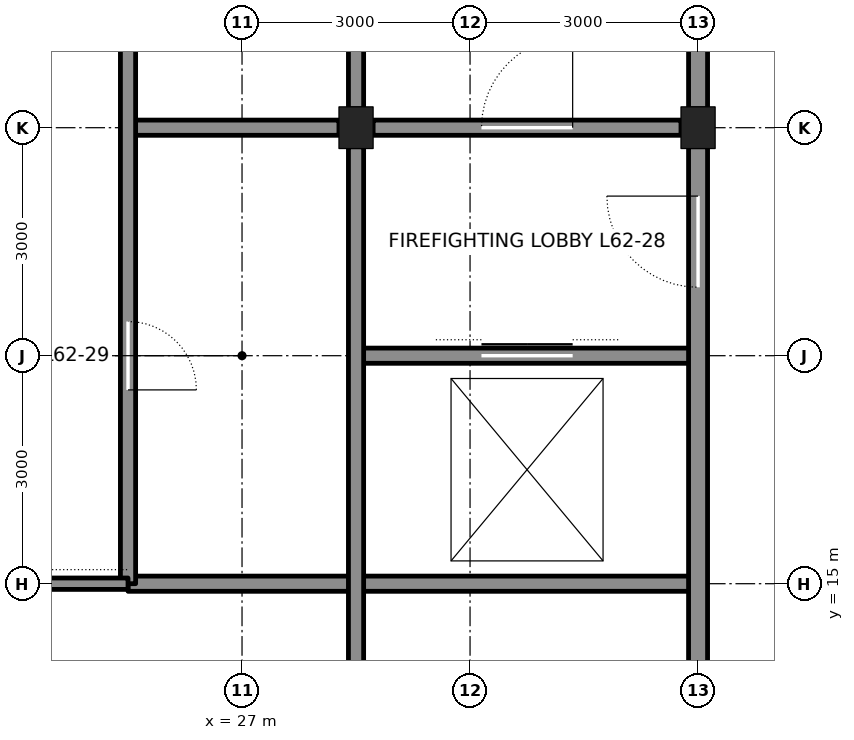
"""IFC4 building model, lengths in metres.
Left out: names, types, materials, properties, quantities, classifications, styles, units other than length and angle.
Written with IfcOpenShell. Run it as: python <this file> out.ifc"""

import sys

from ifc_helpers import new_model, si_unit, direction, frame, frame_2d, origin, origin_2d, place, context, subcontext, project, spatial, rectangle, i_section, extrude, element, fill, save


model = new_model("IFC4")
c1 = context("Model", 3, precision=1e-05, world=origin(), true_north=direction((0.0, 1.0)))
c2 = subcontext(c1, "Body", "Model", "MODEL_VIEW")
j1 = project(units=[si_unit("LENGTHUNIT", "METRE"), si_unit("PLANEANGLEUNIT", "RADIAN")], contexts=[c1])
p1 = place(None, origin())
s1 = spatial("IfcSite", under=j1, at=p1, CompositionType="ELEMENT")
p2 = place(p1, origin())
s2 = spatial("IfcBuilding", under=s1, at=p2, CompositionType="ELEMENT")
p3 = place(p2, frame((0.0, 0.0, 279.0)))
s3 = spatial("IfcBuildingStorey", under=s2, at=p3, CompositionType="ELEMENT", Elevation=279.0)
for number, where, z_axis, x_axis in (
    (1, (33.0, 21.0, 0.0), (0.0, 0.0, 1.0), (1.0, 0.0, 0.0)),
    (2, (28.5, 21.0, 0.0), (0.0, 0.0, 1.0), (1.0, 0.0, 0.0)),
):
    element("IfcColumn", number, at=place(p3, frame(where, z_axis=z_axis, x_axis=x_axis)), inside=s3, PredefinedType="COLUMN", context=c2, shape_type="SweptSolid", body=[
        extrude(i_section(OverallWidth=0.449, OverallDepth=0.549, WebThickness=0.072, FlangeThickness=0.115, at=origin_2d()), origin(), (0.0, 0.0, 1.0), 4.2),
    ])
p4 = place(p3, frame((25.5, 15.0, 0.0), z_axis=(0.0, 0.0, 1.0), x_axis=(1.0, 0.0, 0.0)))
e3 = element("IfcWall", 3, at=p4, inside=s3, PredefinedType="SOLIDWALL", context=c2, shape_type="SweptSolid", body=[
    extrude(rectangle(XDim=7.5, YDim=0.2, at=frame_2d((3.75, 0.0))), origin(), (0.0, 0.0, 1.0), 4.04),
])
p5 = place(p3, frame((28.5, 18.0, 0.0), z_axis=(0.0, 0.0, 1.0), x_axis=(1.0, 0.0, 0.0)))
e4 = element("IfcWall", 4, at=p5, inside=s3, PredefinedType="SOLIDWALL", context=c2, shape_type="SweptSolid", body=[
    extrude(rectangle(XDim=4.5, YDim=0.2, at=frame_2d((2.25, 0.0))), origin(), (0.0, 0.0, 1.0), 4.04),
])
p6 = place(p5, frame((1.65, 0.0, 0.0)))
e5 = element("IfcOpeningElement", 5, at=p6, cuts=e4, PredefinedType="OPENING", context=c2, shape_type="SweptSolid", body=[
    extrude(rectangle(XDim=1.2, YDim=2.1, at=frame_2d((0.6, 1.05))), frame((0.0, 0.11, 0.0), z_axis=(0.0, -1.0, 0.0), x_axis=(1.0, 0.0, 0.0)), (0.0, 0.0, 1.0), 0.22),
])
p7 = place(p3, frame((25.5, 21.0, 0.0), z_axis=(0.0, 0.0, 1.0), x_axis=(1.0, 0.0, 0.0)))
e6 = element("IfcWall", 6, at=p7, inside=s3, PredefinedType="SOLIDWALL", context=c2, shape_type="SweptSolid", body=[
    extrude(rectangle(XDim=2.775, YDim=0.2, at=frame_2d((1.388, 0.0))), origin(), (0.0, 0.0, 1.0), 3.09),
])
p8 = place(p3, frame((28.725, 21.0, 0.0), z_axis=(0.0, 0.0, 1.0), x_axis=(1.0, 0.0, 0.0)))
e7 = element("IfcWall", 7, at=p8, inside=s3, PredefinedType="SOLIDWALL", context=c2, shape_type="SweptSolid", body=[
    extrude(rectangle(XDim=4.05, YDim=0.2, at=frame_2d((2.025, 0.0))), origin(), (0.0, 0.0, 1.0), 3.09),
])
p9 = place(p8, frame((1.425, 0.0, 0.0)))
e8 = element("IfcOpeningElement", 8, at=p9, cuts=e7, PredefinedType="OPENING", context=c2, shape_type="SweptSolid", body=[
    extrude(rectangle(XDim=1.2, YDim=2.1, at=frame_2d((0.6, 1.05))), frame((0.0, 0.11, 0.0), z_axis=(0.0, -1.0, 0.0), x_axis=(1.0, 0.0, 0.0)), (0.0, 0.0, 1.0), 0.22),
])
p10 = place(p3, frame((25.5, 15.0, 0.0), z_axis=(0.0, 0.0, 1.0), x_axis=(0.0, 1.0, 0.0)))
e9 = element("IfcWall", 9, at=p10, inside=s3, PredefinedType="SOLIDWALL", context=c2, shape_type="SweptSolid", body=[
    extrude(rectangle(XDim=12.0, YDim=0.2, at=frame_2d((6.0, 0.0))), origin(), (0.0, 0.0, 1.0), 3.065),
])
p11 = place(p10, frame((2.55, 0.0, 0.0)))
e10 = element("IfcOpeningElement", 10, at=p11, cuts=e9, PredefinedType="OPENING", context=c2, shape_type="SweptSolid", body=[
    extrude(rectangle(XDim=0.9, YDim=2.1, at=frame_2d((0.45, 1.05))), frame((0.0, 0.11, 0.0), z_axis=(0.0, -1.0, 0.0), x_axis=(1.0, 0.0, 0.0)), (0.0, 0.0, 1.0), 0.22),
])
p12 = place(p3, frame((28.5, 12.25, 0.0), z_axis=(0.0, 0.0, 1.0), x_axis=(0.0, 1.0, 0.0)))
e11 = element("IfcWall", 11, at=p12, inside=s3, PredefinedType="SOLIDWALL", context=c2, shape_type="SweptSolid", body=[
    extrude(rectangle(XDim=8.5, YDim=0.2, at=frame_2d((4.25, 0.0))), origin(), (0.0, 0.0, 1.0), 3.113),
])
p13 = place(p3, frame((28.5, 21.25, 0.0), z_axis=(0.0, 0.0, 1.0), x_axis=(0.0, 1.0, 0.0)))
e12 = element("IfcWall", 12, at=p13, inside=s3, PredefinedType="SOLIDWALL", context=c2, shape_type="SweptSolid", body=[
    extrude(rectangle(XDim=2.5, YDim=0.2, at=frame_2d((1.25, 0.0))), origin(), (0.0, 0.0, 1.0), 3.113),
])
p14 = place(p3, frame((33.0, 12.25, 0.0), z_axis=(0.0, 0.0, 1.0), x_axis=(0.0, 1.0, 0.0)))
e13 = element("IfcWall", 13, at=p14, inside=s3, PredefinedType="SOLIDWALL", context=c2, shape_type="SweptSolid", body=[
    extrude(rectangle(XDim=8.5, YDim=0.25, at=frame_2d((4.25, 0.0))), origin(), (0.0, 0.0, 1.0), 3.113),
])
p15 = place(p14, frame((6.65, 0.0, 0.0)))
e14 = element("IfcOpeningElement", 14, at=p15, cuts=e13, PredefinedType="OPENING", context=c2, shape_type="SweptSolid", body=[
    extrude(rectangle(XDim=1.2, YDim=2.1, at=frame_2d((0.6, 1.05))), frame((0.0, 0.135, 0.0), z_axis=(0.0, -1.0, 0.0), x_axis=(1.0, 0.0, 0.0)), (0.0, 0.0, 1.0), 0.27),
])
p16 = place(p14, frame((0.875, 0.0, 0.0)))
e15 = element("IfcOpeningElement", 15, at=p16, cuts=e13, PredefinedType="OPENING", context=c2, shape_type="SweptSolid", body=[
    extrude(rectangle(XDim=0.75, YDim=2.1, at=frame_2d((0.375, 1.05))), frame((0.0, 0.135, 0.0), z_axis=(0.0, -1.0, 0.0), x_axis=(1.0, 0.0, 0.0)), (0.0, 0.0, 1.0), 0.27),
])
p17 = place(p3, frame((33.0, 21.25, 0.0), z_axis=(0.0, 0.0, 1.0), x_axis=(0.0, 1.0, 0.0)))
e16 = element("IfcWall", 16, at=p17, inside=s3, PredefinedType="SOLIDWALL", context=c2, shape_type="SweptSolid", body=[
    extrude(rectangle(XDim=2.5, YDim=0.25, at=frame_2d((1.25, 0.0))), origin(), (0.0, 0.0, 1.0), 3.113),
])
p18 = place(p3, frame((19.5, 15.0, 0.0), z_axis=(0.0, 0.0, 1.0), x_axis=(1.0, 0.0, 0.0)))
e17 = element("IfcWall", 17, at=p18, inside=s3, PredefinedType="PARTITIONING", context=c2, shape_type="SweptSolid", body=[
    extrude(rectangle(XDim=6.0, YDim=0.15, at=frame_2d((3.0, 0.0))), origin(), (0.0, 0.0, 1.0), 4.04),
])
p19 = place(p18, frame((4.0, 0.0, 0.0)))
e18 = element("IfcOpeningElement", 18, at=p19, cuts=e17, PredefinedType="OPENING", context=c2, shape_type="SweptSolid", body=[
    extrude(rectangle(XDim=1.0, YDim=2.1, at=frame_2d((0.5, 1.05))), frame((0.0, 0.085, 0.0), z_axis=(0.0, -1.0, 0.0), x_axis=(1.0, 0.0, 0.0)), (0.0, 0.0, 1.0), 0.17),
])
p20 = place(p18, frame((1.05, 0.0, 0.0)))
e19 = element("IfcOpeningElement", 19, at=p20, cuts=e17, PredefinedType="OPENING", context=c2, shape_type="SweptSolid", body=[
    extrude(rectangle(XDim=0.9, YDim=2.1, at=frame_2d((0.45, 1.05))), frame((0.0, 0.085, 0.0), z_axis=(0.0, -1.0, 0.0), x_axis=(1.0, 0.0, 0.0)), (0.0, 0.0, 1.0), 0.17),
])
p21 = place(p9, origin())
e20 = element("IfcDoor", 20, at=p21, inside=s3, OperationType="SINGLE_SWING_RIGHT", PredefinedType="DOOR", context=c2, shape_type="SweptSolid", body=[
    extrude(rectangle(XDim=1.2, YDim=2.1, at=frame_2d((0.6, 1.05))), frame((0.0, 0.025, 0.0), z_axis=(0.0, -1.0, 0.0), x_axis=(1.0, 0.0, 0.0)), (0.0, 0.0, 1.0), 0.05),
])
fill(e8, e20)
p22 = place(p15, origin())
e21 = element("IfcDoor", 21, at=p22, inside=s3, OperationType="SINGLE_SWING_RIGHT", PredefinedType="DOOR", context=c2, shape_type="SweptSolid", body=[
    extrude(rectangle(XDim=1.2, YDim=2.1, at=frame_2d((0.6, 1.05))), frame((0.0, 0.025, 0.0), z_axis=(0.0, -1.0, 0.0), x_axis=(1.0, 0.0, 0.0)), (0.0, 0.0, 1.0), 0.05),
])
fill(e14, e21)
p23 = place(p6, origin())
e22 = element("IfcDoor", 22, at=p23, inside=s3, OperationType="DOUBLE_DOOR_SLIDING", PredefinedType="DOOR", context=c2, shape_type="SweptSolid", body=[
    extrude(rectangle(XDim=1.2, YDim=2.1, at=frame_2d((0.6, 1.05))), frame((0.0, 0.025, 0.0), z_axis=(0.0, -1.0, 0.0), x_axis=(1.0, 0.0, 0.0)), (0.0, 0.0, 1.0), 0.05),
])
fill(e5, e22)
p24 = place(p11, frame((0.9, 0.0, 0.0), z_axis=(0.0, 0.0, 1.0), x_axis=(-1.0, 0.0, 0.0)))
e23 = element("IfcDoor", 23, at=p24, inside=s3, OperationType="SINGLE_SWING_RIGHT", PredefinedType="DOOR", context=c2, shape_type="SweptSolid", body=[
    extrude(rectangle(XDim=0.9, YDim=2.1, at=frame_2d((0.45, 1.05))), frame((0.0, 0.025, 0.0), z_axis=(0.0, -1.0, 0.0), x_axis=(1.0, 0.0, 0.0)), (0.0, 0.0, 1.0), 0.05),
])
fill(e10, e23)
save(model, sys.argv[1])
